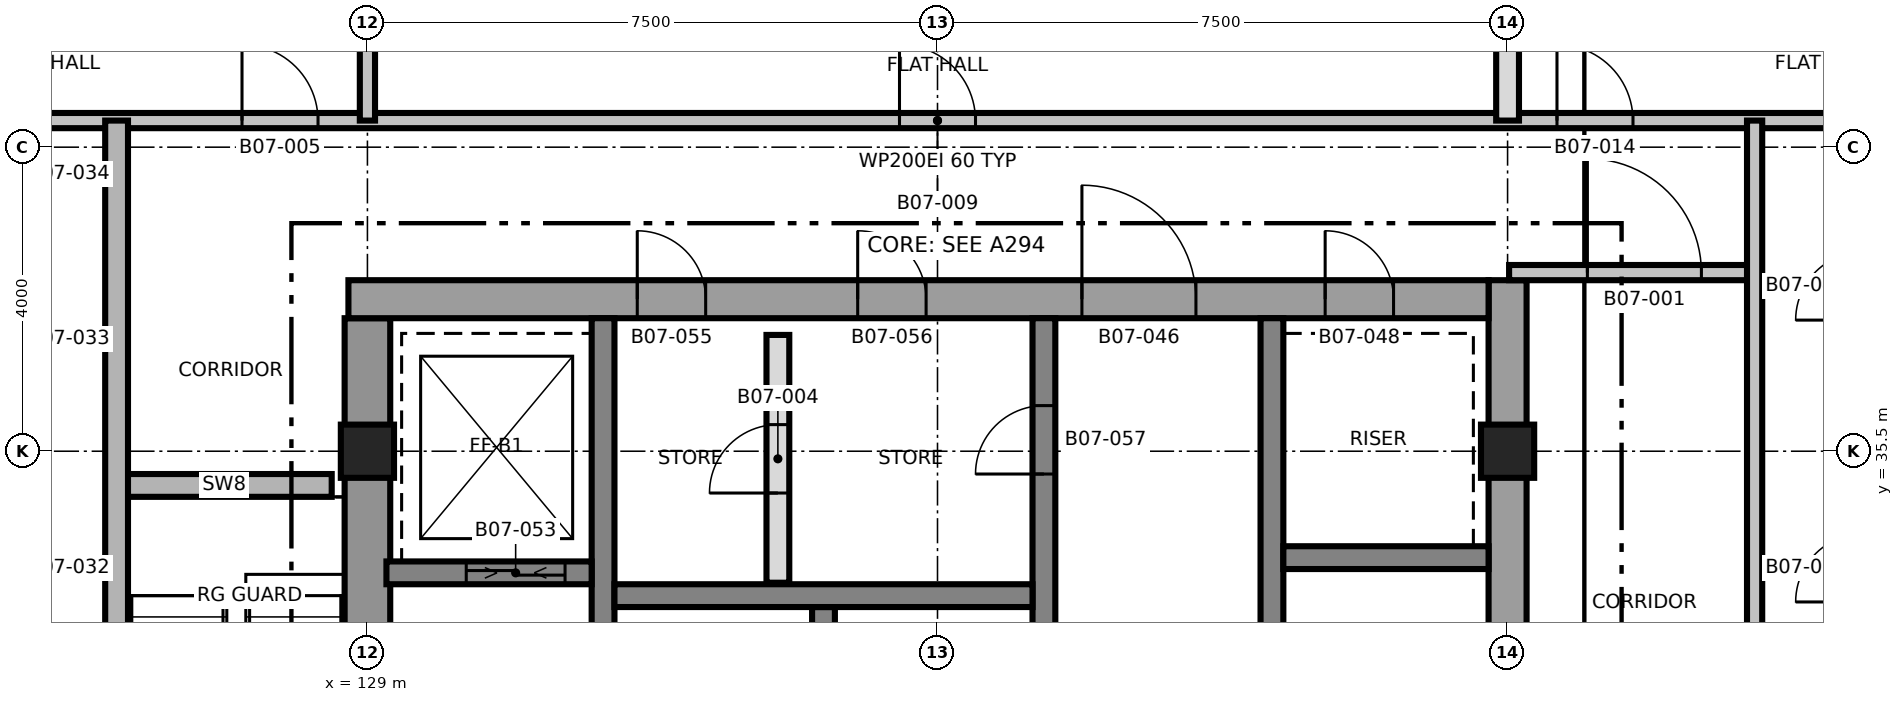
"""IFC4 building model, lengths in metres.
Left out: names, types, materials, properties, quantities, classifications, styles, units other than length and angle.
Written with IfcOpenShell. Run it as: python <this file> out.ifc"""

import sys

from ifc_helpers import new_model, si_unit, direction, frame, frame_2d, origin, origin_2d, place, context, subcontext, project, spatial, rectangle, extrude, element, fill, save


model = new_model("IFC4")
c1 = context("Model", 3, precision=1e-05, world=origin(), true_north=direction((0.0, 1.0)))
c2 = subcontext(c1, "Body", "Model", "MODEL_VIEW")
j1 = project(units=[si_unit("LENGTHUNIT", "METRE"), si_unit("PLANEANGLEUNIT", "RADIAN")], contexts=[c1])
p1 = place(None, origin())
s1 = spatial("IfcSite", under=j1, at=p1, CompositionType="ELEMENT")
p2 = place(p1, origin())
s2 = spatial("IfcBuilding", under=s1, at=p2, CompositionType="ELEMENT")
p3 = place(p2, frame((0.0, 0.0, 90.8)))
s3 = spatial("IfcBuildingStorey", under=s2, at=p3, CompositionType="ELEMENT", Elevation=90.8)
p4 = place(p3, frame((129.0, 24.75, 0.0), z_axis=(0.0, 0.0, 1.0), x_axis=(0.0, 1.0, 0.0)))
e1 = element("IfcWall", 1, at=p4, inside=s3, PredefinedType="SHEAR", context=c2, shape_type="SweptSolid", body=[
    extrude(rectangle(XDim=12.5, YDim=0.6, at=frame_2d((6.25, 0.0))), origin(), (0.0, 0.0, 1.0), 3.7),
])
p5 = place(p4, frame((5.15, 0.0, 0.0)))
e2 = element("IfcOpeningElement", 2, at=p5, cuts=e1, PredefinedType="OPENING", context=c2, shape_type="SweptSolid", body=[
    extrude(rectangle(XDim=1.0, YDim=2.1, at=frame_2d((0.5, 1.05))), frame((0.0, 0.31, 0.0), z_axis=(0.0, -1.0, 0.0), x_axis=(1.0, 0.0, 0.0)), (0.0, 0.0, 1.0), 0.62),
])
p6 = place(p3, frame((144.0, 24.25, 0.0), z_axis=(0.0, 0.0, 1.0), x_axis=(0.0, 1.0, 0.0)))
e3 = element("IfcWall", 3, at=p6, inside=s3, PredefinedType="SHEAR", context=c2, shape_type="SweptSolid", body=[
    extrude(rectangle(XDim=13.5, YDim=0.5, at=frame_2d((6.75, 0.0))), origin(), (0.0, 0.0, 1.0), 3.7),
])
p7 = place(p3, frame((128.75, 37.5, 0.0), z_axis=(0.0, 0.0, 1.0), x_axis=(1.0, 0.0, 0.0)))
e4 = element("IfcWall", 4, at=p7, inside=s3, PredefinedType="SHEAR", context=c2, shape_type="SweptSolid", body=[
    extrude(rectangle(XDim=15.0, YDim=0.5, at=frame_2d((7.5, 0.0))), origin(), (0.0, 0.0, 1.0), 3.7),
])
p8 = place(p7, frame((9.65, 0.0, 0.0)))
e5 = element("IfcOpeningElement", 5, at=p8, cuts=e4, PredefinedType="OPENING", context=c2, shape_type="SweptSolid", body=[
    extrude(rectangle(XDim=1.5, YDim=2.1, at=frame_2d((0.75, 1.05))), frame((0.0, 0.26, 0.0), z_axis=(0.0, -1.0, 0.0), x_axis=(1.0, 0.0, 0.0)), (0.0, 0.0, 1.0), 0.52),
])
p9 = place(p7, frame((12.85, 0.0, 0.0)))
e6 = element("IfcOpeningElement", 6, at=p9, cuts=e4, PredefinedType="OPENING", context=c2, shape_type="SweptSolid", body=[
    extrude(rectangle(XDim=0.9, YDim=2.1, at=frame_2d((0.45, 1.05))), frame((0.0, 0.26, 0.0), z_axis=(0.0, -1.0, 0.0), x_axis=(1.0, 0.0, 0.0)), (0.0, 0.0, 1.0), 0.52),
])
p10 = place(p7, frame((3.8, 0.0, 0.0)))
e7 = element("IfcOpeningElement", 7, at=p10, cuts=e4, PredefinedType="OPENING", context=c2, shape_type="SweptSolid", body=[
    extrude(rectangle(XDim=0.9, YDim=2.1, at=frame_2d((0.45, 1.05))), frame((0.0, 0.26, 0.0), z_axis=(0.0, -1.0, 0.0), x_axis=(1.0, 0.0, 0.0)), (0.0, 0.0, 1.0), 0.52),
])
p11 = place(p7, frame((6.7, 0.0, 0.0)))
e8 = element("IfcOpeningElement", 8, at=p11, cuts=e4, PredefinedType="OPENING", context=c2, shape_type="SweptSolid", body=[
    extrude(rectangle(XDim=0.9, YDim=2.1, at=frame_2d((0.45, 1.05))), frame((0.0, 0.26, 0.0), z_axis=(0.0, -1.0, 0.0), x_axis=(1.0, 0.0, 0.0)), (0.0, 0.0, 1.0), 0.52),
])
p12 = place(p3, frame((132.1, 24.75, 0.0), z_axis=(0.0, 0.0, 1.0), x_axis=(0.0, 1.0, 0.0)))
e9 = element("IfcWall", 9, at=p12, inside=s3, PredefinedType="SHEAR", context=c2, shape_type="SweptSolid", body=[
    extrude(rectangle(XDim=12.5, YDim=0.3, at=frame_2d((6.25, 0.0))), origin(), (0.0, 0.0, 1.0), 3.7),
])
p13 = place(p12, frame((3.9, 0.0, 0.0)))
e10 = element("IfcOpeningElement", 10, at=p13, cuts=e9, PredefinedType="OPENING", context=c2, shape_type="SweptSolid", body=[
    extrude(rectangle(XDim=1.2, YDim=2.1, at=frame_2d((0.6, 1.05))), frame((0.0, 0.16, 0.0), z_axis=(0.0, -1.0, 0.0), x_axis=(1.0, 0.0, 0.0)), (0.0, 0.0, 1.0), 0.32),
])
p14 = place(p3, frame((137.9, 24.75, 0.0), z_axis=(0.0, 0.0, 1.0), x_axis=(0.0, 1.0, 0.0)))
e11 = element("IfcWall", 11, at=p14, inside=s3, PredefinedType="SHEAR", context=c2, shape_type="SweptSolid", body=[
    extrude(rectangle(XDim=12.5, YDim=0.3, at=frame_2d((6.25, 0.0))), origin(), (0.0, 0.0, 1.0), 3.7),
])
p15 = place(p14, frame((3.95, 0.0, 0.0)))
e12 = element("IfcOpeningElement", 12, at=p15, cuts=e11, PredefinedType="OPENING", context=c2, shape_type="SweptSolid", body=[
    extrude(rectangle(XDim=1.5, YDim=2.1, at=frame_2d((0.75, 1.05))), frame((0.0, 0.16, 0.0), z_axis=(0.0, -1.0, 0.0), x_axis=(1.0, 0.0, 0.0)), (0.0, 0.0, 1.0), 0.32),
])
p16 = place(p14, frame((10.45, 0.0, 0.0)))
e13 = element("IfcOpeningElement", 13, at=p16, cuts=e11, PredefinedType="OPENING", context=c2, shape_type="SweptSolid", body=[
    extrude(rectangle(XDim=0.9, YDim=2.1, at=frame_2d((0.45, 1.05))), frame((0.0, 0.16, 0.0), z_axis=(0.0, -1.0, 0.0), x_axis=(1.0, 0.0, 0.0)), (0.0, 0.0, 1.0), 0.32),
])
p17 = place(p3, frame((140.9, 24.75, 0.0), z_axis=(0.0, 0.0, 1.0), x_axis=(0.0, 1.0, 0.0)))
e14 = element("IfcWall", 14, at=p17, inside=s3, PredefinedType="SHEAR", context=c2, shape_type="SweptSolid", body=[
    extrude(rectangle(XDim=12.5, YDim=0.3, at=frame_2d((6.25, 0.0))), origin(), (0.0, 0.0, 1.0), 3.7),
])
p18 = place(p17, frame((5.9, 0.0, 0.0)))
e15 = element("IfcOpeningElement", 15, at=p18, cuts=e14, PredefinedType="OPENING", context=c2, shape_type="SweptSolid", body=[
    extrude(rectangle(XDim=1.2, YDim=2.1, at=frame_2d((0.6, 1.05))), frame((0.0, 0.16, 0.0), z_axis=(0.0, -1.0, 0.0), x_axis=(1.0, 0.0, 0.0)), (0.0, 0.0, 1.0), 0.32),
])
p19 = place(p3, frame((135.0, 30.85, 0.0), z_axis=(0.0, 0.0, 1.0), x_axis=(0.0, 1.0, 0.0)))
e16 = element("IfcWall", 16, at=p19, inside=s3, PredefinedType="SHEAR", context=c2, shape_type="SweptSolid", body=[
    extrude(rectangle(XDim=2.6, YDim=0.3, at=frame_2d((1.3, 0.0))), origin(), (0.0, 0.0, 1.0), 3.7),
])
p20 = place(p3, frame((132.25, 33.6, 0.0), z_axis=(0.0, 0.0, 1.0), x_axis=(1.0, 0.0, 0.0)))
e17 = element("IfcWall", 17, at=p20, inside=s3, PredefinedType="SHEAR", context=c2, shape_type="SweptSolid", body=[
    extrude(rectangle(XDim=5.5, YDim=0.3, at=frame_2d((2.75, 0.0))), origin(), (0.0, 0.0, 1.0), 3.7),
])
p21 = place(p3, frame((129.25, 33.9, 0.0), z_axis=(0.0, 0.0, 1.0), x_axis=(1.0, 0.0, 0.0)))
e18 = element("IfcWall", 18, at=p21, inside=s3, PredefinedType="SHEAR", context=c2, shape_type="SweptSolid", body=[
    extrude(rectangle(XDim=2.7, YDim=0.3, at=frame_2d((1.35, 0.0))), origin(), (0.0, 0.0, 1.0), 3.7),
])
p22 = place(p21, frame((1.05, 0.0, 0.0)))
e19 = element("IfcOpeningElement", 19, at=p22, cuts=e18, PredefinedType="OPENING", context=c2, shape_type="SweptSolid", body=[
    extrude(rectangle(XDim=1.3, YDim=2.4, at=frame_2d((0.65, 1.2))), frame((0.0, 0.16, 0.0), z_axis=(0.0, -1.0, 0.0), x_axis=(1.0, 0.0, 0.0)), (0.0, 0.0, 1.0), 0.32),
])
p23 = place(p3, frame((141.05, 34.1, 0.0), z_axis=(0.0, 0.0, 1.0), x_axis=(1.0, 0.0, 0.0)))
e20 = element("IfcWall", 20, at=p23, inside=s3, PredefinedType="SHEAR", context=c2, shape_type="SweptSolid", body=[
    extrude(rectangle(XDim=2.7, YDim=0.3, at=frame_2d((1.35, 0.0))), origin(), (0.0, 0.0, 1.0), 3.7),
])
for number, where, z_axis, x_axis in (
    (21, (129.0, 35.5, 0.0), (0.0, 0.0, 1.0), (1.0, 0.0, 0.0)),
    (22, (144.0, 35.5, 0.0), (0.0, 0.0, 1.0), (1.0, 0.0, 0.0)),
):
    element("IfcColumn", number, at=place(p3, frame(where, z_axis=z_axis, x_axis=x_axis)), inside=s3, PredefinedType="COLUMN", context=c2, shape_type="SweptSolid", body=[
        extrude(rectangle(XDim=0.7, YDim=0.7, at=origin_2d()), origin(), (0.0, 0.0, 1.0), 3.7),
    ])
p24 = place(p3, frame((125.7, 35.05, 0.0), z_axis=(0.0, 0.0, 1.0), x_axis=(1.0, 0.0, 0.0)))
e23 = element("IfcWall", 23, at=p24, inside=s3, PredefinedType="SHEAR", context=c2, shape_type="SweptSolid", body=[
    extrude(rectangle(XDim=2.83, YDim=0.3, at=frame_2d((1.415, 0.0))), origin(), (0.0, 0.0, 1.0), 3.4),
])
p25 = place(p3, frame((144.02, 37.85, 0.0), z_axis=(0.0, 0.0, 1.0), x_axis=(1.0, 0.0, 0.0)))
e24 = element("IfcWall", 24, at=p25, inside=s3, PredefinedType="PARTITIONING", context=c2, shape_type="SweptSolid", body=[
    extrude(rectangle(XDim=3.23, YDim=0.2, at=frame_2d((1.615, 0.0))), origin(), (0.0, 0.0, 1.0), 3.4),
])
p26 = place(p25, frame((1.03, 0.0, 0.0)))
e25 = element("IfcOpeningElement", 25, at=p26, cuts=e24, PredefinedType="OPENING", context=c2, shape_type="SweptSolid", body=[
    extrude(rectangle(XDim=1.5, YDim=2.1, at=frame_2d((0.75, 1.05))), frame((0.0, 0.11, 0.0), z_axis=(0.0, -1.0, 0.0), x_axis=(1.0, 0.0, 0.0)), (0.0, 0.0, 1.0), 0.22),
])
p27 = place(p3, frame((120.56, 39.85, 0.0), z_axis=(0.0, 0.0, 1.0), x_axis=(1.0, 0.0, 0.0)))
e26 = element("IfcWall", 26, at=p27, inside=s3, PredefinedType="PARTITIONING", context=c2, shape_type="SweptSolid", body=[
    extrude(rectangle(XDim=31.88, YDim=0.2, at=frame_2d((15.94, 0.0))), origin(), (0.0, 0.0, 1.0), 3.4),
])
p28 = place(p27, frame((6.79, 0.0, 0.0)))
e27 = element("IfcOpeningElement", 27, at=p28, cuts=e26, PredefinedType="OPENING", context=c2, shape_type="SweptSolid", body=[
    extrude(rectangle(XDim=1.0, YDim=2.1, at=frame_2d((0.5, 1.05))), frame((0.0, 0.11, 0.0), z_axis=(0.0, -1.0, 0.0), x_axis=(1.0, 0.0, 0.0)), (0.0, 0.0, 1.0), 0.22),
])
p29 = place(p27, frame((15.44, 0.0, 0.0)))
e28 = element("IfcOpeningElement", 28, at=p29, cuts=e26, PredefinedType="OPENING", context=c2, shape_type="SweptSolid", body=[
    extrude(rectangle(XDim=1.0, YDim=2.1, at=frame_2d((0.5, 1.05))), frame((0.0, 0.11, 0.0), z_axis=(0.0, -1.0, 0.0), x_axis=(1.0, 0.0, 0.0)), (0.0, 0.0, 1.0), 0.22),
])
p30 = place(p27, frame((24.09, 0.0, 0.0)))
e29 = element("IfcOpeningElement", 29, at=p30, cuts=e26, PredefinedType="OPENING", context=c2, shape_type="SweptSolid", body=[
    extrude(rectangle(XDim=1.0, YDim=2.1, at=frame_2d((0.5, 1.05))), frame((0.0, 0.11, 0.0), z_axis=(0.0, -1.0, 0.0), x_axis=(1.0, 0.0, 0.0)), (0.0, 0.0, 1.0), 0.22),
])
p31 = place(p3, frame((125.7, 22.15, 0.0), z_axis=(0.0, 0.0, 1.0), x_axis=(0.0, 1.0, 0.0)))
e30 = element("IfcWall", 30, at=p31, inside=s3, PredefinedType="SHEAR", context=c2, shape_type="SweptSolid", body=[
    extrude(rectangle(XDim=17.7, YDim=0.3, at=frame_2d((8.85, 0.0))), origin(), (0.0, 0.0, 1.0), 3.4),
])
p32 = place(p31, frame((2.7, 0.0, 0.0)))
e31 = element("IfcOpeningElement", 31, at=p32, cuts=e30, PredefinedType="OPENING", context=c2, shape_type="SweptSolid", body=[
    extrude(rectangle(XDim=1.0, YDim=2.1, at=frame_2d((0.5, 1.05))), frame((0.0, 0.16, 0.0), z_axis=(0.0, -1.0, 0.0), x_axis=(1.0, 0.0, 0.0)), (0.0, 0.0, 1.0), 0.32),
])
p33 = place(p3, frame((129.0, 39.85, 0.0), z_axis=(0.0, 0.0, 1.0), x_axis=(0.0, 1.0, 0.0)))
e32 = element("IfcWall", 32, at=p33, inside=s3, PredefinedType="PARTITIONING", context=c2, shape_type="SweptSolid", body=[
    extrude(rectangle(XDim=5.59, YDim=0.2, at=frame_2d((2.795, 0.0))), origin(), (0.0, 0.0, 1.0), 3.4),
])
p34 = place(p3, frame((134.4, 33.77, 0.0), z_axis=(0.0, 0.0, 1.0), x_axis=(0.0, 1.0, 0.0)))
e33 = element("IfcWall", 33, at=p34, inside=s3, PredefinedType="PARTITIONING", context=c2, shape_type="SweptSolid", body=[
    extrude(rectangle(XDim=3.26, YDim=0.3, at=frame_2d((1.63, 0.0))), origin(), (0.0, 0.0, 1.0), 3.4),
])
p35 = place(p34, frame((1.18, 0.0, 0.0)))
e34 = element("IfcOpeningElement", 34, at=p35, cuts=e33, PredefinedType="OPENING", context=c2, shape_type="SweptSolid", body=[
    extrude(rectangle(XDim=0.9, YDim=2.1, at=frame_2d((0.45, 1.05))), frame((0.0, 0.16, 0.0), z_axis=(0.0, -1.0, 0.0), x_axis=(1.0, 0.0, 0.0)), (0.0, 0.0, 1.0), 0.32),
])
p36 = place(p3, frame((144.0, 39.85, 0.0), z_axis=(0.0, 0.0, 1.0), x_axis=(0.0, 1.0, 0.0)))
e35 = element("IfcWall", 35, at=p36, inside=s3, PredefinedType="PARTITIONING", context=c2, shape_type="SweptSolid", body=[
    extrude(rectangle(XDim=2.987, YDim=0.3, at=frame_2d((1.493, 0.0))), origin(), (0.0, 0.0, 1.0), 3.4),
])
p37 = place(p3, frame((147.25, 22.15, 0.0), z_axis=(0.0, 0.0, 1.0), x_axis=(0.0, 1.0, 0.0)))
e36 = element("IfcWall", 36, at=p37, inside=s3, PredefinedType="PARTITIONING", context=c2, shape_type="SweptSolid", body=[
    extrude(rectangle(XDim=17.7, YDim=0.2, at=frame_2d((8.85, 0.0))), origin(), (0.0, 0.0, 1.0), 3.4),
])
p38 = place(p37, frame((2.65, 0.0, 0.0)))
e37 = element("IfcOpeningElement", 37, at=p38, cuts=e36, PredefinedType="OPENING", context=c2, shape_type="SweptSolid", body=[
    extrude(rectangle(XDim=1.0, YDim=2.1, at=frame_2d((0.5, 1.05))), frame((0.0, 0.11, 0.0), z_axis=(0.0, -1.0, 0.0), x_axis=(1.0, 0.0, 0.0)), (0.0, 0.0, 1.0), 0.22),
])
p39 = place(p26, origin())
e38 = element("IfcDoor", 38, at=p39, inside=s3, OperationType="SINGLE_SWING_LEFT", PredefinedType="DOOR", context=c2, shape_type="SweptSolid", body=[
    extrude(rectangle(XDim=1.5, YDim=2.1, at=frame_2d((0.75, 1.05))), frame((0.0, 0.025, 0.0), z_axis=(0.0, -1.0, 0.0), x_axis=(1.0, 0.0, 0.0)), (0.0, 0.0, 1.0), 0.05),
])
fill(e25, e38)
p40 = place(p35, origin())
e39 = element("IfcDoor", 39, at=p40, inside=s3, OperationType="SINGLE_SWING_RIGHT", PredefinedType="DOOR", context=c2, shape_type="SweptSolid", body=[
    extrude(rectangle(XDim=0.9, YDim=2.1, at=frame_2d((0.45, 1.05))), frame((0.0, 0.025, 0.0), z_axis=(0.0, -1.0, 0.0), x_axis=(1.0, 0.0, 0.0)), (0.0, 0.0, 1.0), 0.05),
])
fill(e34, e39)
p41 = place(p28, origin())
e40 = element("IfcDoor", 40, at=p41, inside=s3, OperationType="SINGLE_SWING_LEFT", PredefinedType="DOOR", context=c2, shape_type="SweptSolid", body=[
    extrude(rectangle(XDim=1.0, YDim=2.1, at=frame_2d((0.5, 1.05))), frame((0.0, 0.025, 0.0), z_axis=(0.0, -1.0, 0.0), x_axis=(1.0, 0.0, 0.0)), (0.0, 0.0, 1.0), 0.05),
])
fill(e27, e40)
p42 = place(p29, origin())
e41 = element("IfcDoor", 41, at=p42, inside=s3, OperationType="SINGLE_SWING_LEFT", PredefinedType="DOOR", context=c2, shape_type="SweptSolid", body=[
    extrude(rectangle(XDim=1.0, YDim=2.1, at=frame_2d((0.5, 1.05))), frame((0.0, 0.025, 0.0), z_axis=(0.0, -1.0, 0.0), x_axis=(1.0, 0.0, 0.0)), (0.0, 0.0, 1.0), 0.05),
])
fill(e28, e41)
p43 = place(p30, origin())
e42 = element("IfcDoor", 42, at=p43, inside=s3, OperationType="SINGLE_SWING_RIGHT", PredefinedType="DOOR", context=c2, shape_type="SweptSolid", body=[
    extrude(rectangle(XDim=1.0, YDim=2.1, at=frame_2d((0.5, 1.05))), frame((0.0, 0.025, 0.0), z_axis=(0.0, -1.0, 0.0), x_axis=(1.0, 0.0, 0.0)), (0.0, 0.0, 1.0), 0.05),
])
fill(e29, e42)
p44 = place(p8, origin())
e43 = element("IfcDoor", 43, at=p44, inside=s3, OperationType="SINGLE_SWING_RIGHT", PredefinedType="DOOR", context=c2, shape_type="SweptSolid", body=[
    extrude(rectangle(XDim=1.5, YDim=2.1, at=frame_2d((0.75, 1.05))), frame((0.0, 0.025, 0.0), z_axis=(0.0, -1.0, 0.0), x_axis=(1.0, 0.0, 0.0)), (0.0, 0.0, 1.0), 0.05),
])
fill(e5, e43)
p45 = place(p9, origin())
e44 = element("IfcDoor", 44, at=p45, inside=s3, OperationType="SINGLE_SWING_RIGHT", PredefinedType="DOOR", context=c2, shape_type="SweptSolid", body=[
    extrude(rectangle(XDim=0.9, YDim=2.1, at=frame_2d((0.45, 1.05))), frame((0.0, 0.025, 0.0), z_axis=(0.0, -1.0, 0.0), x_axis=(1.0, 0.0, 0.0)), (0.0, 0.0, 1.0), 0.05),
])
fill(e6, e44)
p46 = place(p22, origin())
e45 = element("IfcDoor", 45, at=p46, inside=s3, OperationType="SLIDING_TO_LEFT", PredefinedType="DOOR", context=c2, shape_type="SweptSolid", body=[
    extrude(rectangle(XDim=1.3, YDim=2.4, at=frame_2d((0.65, 1.2))), frame((0.0, 0.025, 0.0), z_axis=(0.0, -1.0, 0.0), x_axis=(1.0, 0.0, 0.0)), (0.0, 0.0, 1.0), 0.05),
])
fill(e19, e45)
p47 = place(p10, origin())
e46 = element("IfcDoor", 46, at=p47, inside=s3, OperationType="SINGLE_SWING_LEFT", PredefinedType="DOOR", context=c2, shape_type="SweptSolid", body=[
    extrude(rectangle(XDim=0.9, YDim=2.1, at=frame_2d((0.45, 1.05))), frame((0.0, 0.025, 0.0), z_axis=(0.0, -1.0, 0.0), x_axis=(1.0, 0.0, 0.0)), (0.0, 0.0, 1.0), 0.05),
])
fill(e7, e46)
p48 = place(p11, origin())
e47 = element("IfcDoor", 47, at=p48, inside=s3, OperationType="SINGLE_SWING_RIGHT", PredefinedType="DOOR", context=c2, shape_type="SweptSolid", body=[
    extrude(rectangle(XDim=0.9, YDim=2.1, at=frame_2d((0.45, 1.05))), frame((0.0, 0.025, 0.0), z_axis=(0.0, -1.0, 0.0), x_axis=(1.0, 0.0, 0.0)), (0.0, 0.0, 1.0), 0.05),
])
fill(e8, e47)
p49 = place(p16, origin())
e48 = element("IfcDoor", 48, at=p49, inside=s3, OperationType="SINGLE_SWING_RIGHT", PredefinedType="DOOR", context=c2, shape_type="SweptSolid", body=[
    extrude(rectangle(XDim=0.9, YDim=2.1, at=frame_2d((0.45, 1.05))), frame((0.0, 0.025, 0.0), z_axis=(0.0, -1.0, 0.0), x_axis=(1.0, 0.0, 0.0)), (0.0, 0.0, 1.0), 0.05),
])
fill(e13, e48)
save(model, sys.argv[1])
